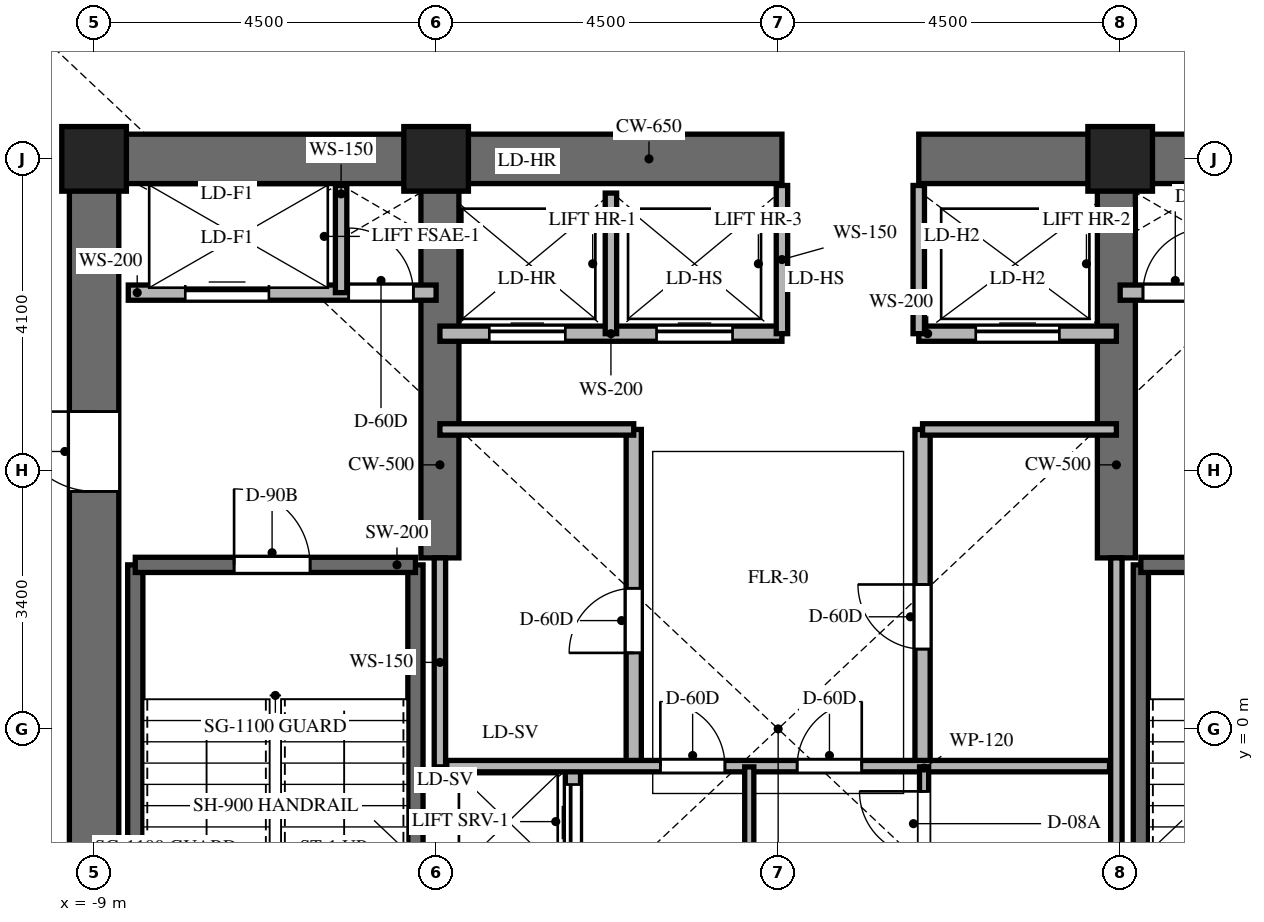
"""IFC4 building model, lengths in metres.
Left out: names, types, materials, properties, quantities, classifications, styles, units other than length and angle.
Written with IfcOpenShell. Run it as: python <this file> out.ifc"""

import sys

from ifc_helpers import new_model, si_unit, direction, frame, frame_2d, origin, origin_2d, place, context, subcontext, project, spatial, rectangle, extrude, element, fill, save


model = new_model("IFC4")
c1 = context("Model", 3, precision=1e-05, world=origin(), true_north=direction((0.0, 1.0)))
c2 = subcontext(c1, "Body", "Model", "MODEL_VIEW")
j1 = project(units=[si_unit("LENGTHUNIT", "METRE"), si_unit("PLANEANGLEUNIT", "RADIAN")], contexts=[c1])
p1 = place(None, origin())
s1 = spatial("IfcSite", under=j1, at=p1, CompositionType="ELEMENT")
p2 = place(p1, origin())
s2 = spatial("IfcBuilding", under=s1, at=p2, CompositionType="ELEMENT")
p3 = place(p2, frame((0.0, 0.0, 305.4)))
s3 = spatial("IfcBuildingStorey", under=s2, at=p3, CompositionType="ELEMENT", Elevation=305.4)
p4 = place(p3, frame((-9.325, 7.5, 0.0), z_axis=(0.0, 0.0, 1.0), x_axis=(1.0, 0.0, 0.0)))
e1 = element("IfcWall", 1, at=p4, inside=s3, PredefinedType="SHEAR", context=c2, shape_type="SweptSolid", body=[
    extrude(rectangle(XDim=9.375, YDim=0.65, at=frame_2d((4.688, 0.0))), origin(), (0.0, 0.0, 1.0), 5.0),
])
p5 = place(p3, frame((1.85, 7.5, 0.0), z_axis=(0.0, 0.0, 1.0), x_axis=(1.0, 0.0, 0.0)))
e2 = element("IfcWall", 2, at=p5, inside=s3, PredefinedType="SHEAR", context=c2, shape_type="SweptSolid", body=[
    extrude(rectangle(XDim=7.475, YDim=0.65, at=frame_2d((3.737, 0.0))), origin(), (0.0, 0.0, 1.0), 5.0),
])
p6 = place(p3, frame((-9.0, -7.175, 0.0), z_axis=(0.0, 0.0, 1.0), x_axis=(0.0, 1.0, 0.0)))
e3 = element("IfcWall", 3, at=p6, inside=s3, PredefinedType="SHEAR", context=c2, shape_type="SweptSolid", body=[
    extrude(rectangle(XDim=14.35, YDim=0.65, at=frame_2d((7.175, 0.0))), origin(), (0.0, 0.0, 1.0), 5.0),
])
p7 = place(p6, frame((10.3, 0.0, 0.0)))
e4 = element("IfcOpeningElement", 4, at=p7, cuts=e3, PredefinedType="OPENING", context=c2, shape_type="SweptSolid", body=[
    extrude(rectangle(XDim=1.05, YDim=2.15, at=frame_2d((0.525, 1.075))), frame((0.0, 0.335, 0.0), z_axis=(0.0, -1.0, 0.0), x_axis=(1.0, 0.0, 0.0)), (0.0, 0.0, 1.0), 0.67),
])
for number, where, z_axis, x_axis in (
    (5, (-4.45, 2.25, 0.0), (0.0, 0.0, 1.0), (0.0, 1.0, 0.0)),
    (6, (4.45, 2.25, 0.0), (0.0, 0.0, 1.0), (0.0, 1.0, 0.0)),
):
    element("IfcWall", number, at=place(p3, frame(where, z_axis=z_axis, x_axis=x_axis)), inside=s3, PredefinedType="SHEAR", context=c2, shape_type="SweptSolid", body=[
        extrude(rectangle(XDim=4.925, YDim=0.5, at=frame_2d((2.462, 0.0))), origin(), (0.0, 0.0, 1.0), 5.0),
    ])
for number, where, z_axis, x_axis in (
    (7, (-8.458, -6.985, 0.0), (0.0, 0.0, 1.0), (0.0, 1.0, 0.0)),
    (8, (-4.772, -6.985, 0.0), (0.0, 0.0, 1.0), (0.0, 1.0, 0.0)),
):
    element("IfcWall", number, at=place(p3, frame(where, z_axis=z_axis, x_axis=x_axis)), inside=s3, PredefinedType="SHEAR", context=c2, shape_type="SweptSolid", body=[
        extrude(rectangle(XDim=9.143, YDim=0.2, at=frame_2d((4.572, 0.0))), origin(), (0.0, 0.0, 1.0), 5.0),
    ])
p8 = place(p3, frame((-8.458, 2.158, 0.0), z_axis=(0.0, 0.0, 1.0), x_axis=(1.0, 0.0, 0.0)))
e9 = element("IfcWall", 9, at=p8, inside=s3, PredefinedType="SHEAR", context=c2, shape_type="SweptSolid", body=[
    extrude(rectangle(XDim=3.686, YDim=0.2, at=frame_2d((1.843, 0.0))), origin(), (0.0, 0.0, 1.0), 5.0),
])
p9 = place(p8, frame((1.3, 0.0, 0.0)))
e10 = element("IfcOpeningElement", 10, at=p9, cuts=e9, PredefinedType="OPENING", context=c2, shape_type="SweptSolid", body=[
    extrude(rectangle(XDim=1.0, YDim=2.15, at=frame_2d((0.5, 1.075))), frame((0.0, 0.11, 0.0), z_axis=(0.0, -1.0, 0.0), x_axis=(1.0, 0.0, 0.0)), (0.0, 0.0, 1.0), 0.22),
])
p10 = place(p3, frame((4.772, -6.985, 0.0), z_axis=(0.0, 0.0, 1.0), x_axis=(0.0, 1.0, 0.0)))
e11 = element("IfcWall", 11, at=p10, inside=s3, PredefinedType="SHEAR", context=c2, shape_type="SweptSolid", body=[
    extrude(rectangle(XDim=9.143, YDim=0.2, at=frame_2d((4.572, 0.0))), origin(), (0.0, 0.0, 1.0), 5.0),
])
p11 = place(p3, frame((4.772, 2.158, 0.0), z_axis=(0.0, 0.0, 1.0), x_axis=(1.0, 0.0, 0.0)))
e12 = element("IfcWall", 12, at=p11, inside=s3, PredefinedType="SHEAR", context=c2, shape_type="SweptSolid", body=[
    extrude(rectangle(XDim=3.686, YDim=0.2, at=frame_2d((1.843, 0.0))), origin(), (0.0, 0.0, 1.0), 5.0),
])
p12 = place(p11, frame((1.35, 0.0, 0.0)))
e13 = element("IfcOpeningElement", 13, at=p12, cuts=e12, PredefinedType="OPENING", context=c2, shape_type="SweptSolid", body=[
    extrude(rectangle(XDim=1.0, YDim=2.15, at=frame_2d((0.5, 1.075))), frame((0.0, 0.11, 0.0), z_axis=(0.0, -1.0, 0.0), x_axis=(1.0, 0.0, 0.0)), (0.0, 0.0, 1.0), 0.22),
])
for number, where, z_axis, x_axis in (
    (14, (4.5, 7.5, 0.0), (0.0, 0.0, 1.0), (1.0, 0.0, 0.0)),
    (15, (-4.5, 7.5, 0.0), (0.0, 0.0, 1.0), (1.0, 0.0, 0.0)),
    (16, (-9.0, 7.5, 0.0), (0.0, 0.0, 1.0), (1.0, 0.0, 0.0)),
):
    element("IfcColumn", number, at=place(p3, frame(where, z_axis=z_axis, x_axis=x_axis)), inside=s3, PredefinedType="COLUMN", context=c2, shape_type="SweptSolid", body=[
        extrude(rectangle(XDim=0.85, YDim=0.85, at=origin_2d()), origin(), (0.0, 0.0, 1.0), 5.0),
    ])
p13 = place(p3, frame((-8.55, 5.74, 0.0), z_axis=(0.0, 0.0, 1.0), x_axis=(1.0, 0.0, 0.0)))
e17 = element("IfcWall", 17, at=p13, inside=s3, PredefinedType="PARTITIONING", context=c2, shape_type="SweptSolid", body=[
    extrude(rectangle(XDim=4.05, YDim=0.2, at=frame_2d((2.025, 0.0))), origin(), (0.0, 0.0, 1.0), 4.68),
])
p14 = place(p13, frame((0.75, 0.0, 0.0)))
e18 = element("IfcOpeningElement", 18, at=p14, cuts=e17, PredefinedType="OPENING", context=c2, shape_type="SweptSolid", body=[
    extrude(rectangle(XDim=1.1, YDim=2.2, at=frame_2d((0.55, 1.1))), frame((0.0, 0.11, 0.0), z_axis=(0.0, -1.0, 0.0), x_axis=(1.0, 0.0, 0.0)), (0.0, 0.0, 1.0), 0.22),
])
p15 = place(p13, frame((2.9, 0.0, 0.0)))
e19 = element("IfcOpeningElement", 19, at=p15, cuts=e17, PredefinedType="OPENING", context=c2, shape_type="SweptSolid", body=[
    extrude(rectangle(XDim=0.85, YDim=2.03, at=frame_2d((0.425, 1.015))), frame((0.0, 0.11, 0.0), z_axis=(0.0, -1.0, 0.0), x_axis=(1.0, 0.0, 0.0)), (0.0, 0.0, 1.0), 0.22),
])
p16 = place(p3, frame((-5.75, 5.74, 0.0), z_axis=(0.0, 0.0, 1.0), x_axis=(0.0, 1.0, 0.0)))
e20 = element("IfcWall", 20, at=p16, inside=s3, PredefinedType="PARTITIONING", context=c2, shape_type="SweptSolid", body=[
    extrude(rectangle(XDim=1.41, YDim=0.15, at=frame_2d((0.705, 0.0))), origin(), (0.0, 0.0, 1.0), 4.68),
])
p17 = place(p3, frame((4.5, 5.74, 0.0), z_axis=(0.0, 0.0, 1.0), x_axis=(1.0, 0.0, 0.0)))
e21 = element("IfcWall", 21, at=p17, inside=s3, PredefinedType="PARTITIONING", context=c2, shape_type="SweptSolid", body=[
    extrude(rectangle(XDim=4.05, YDim=0.2, at=frame_2d((2.025, 0.0))), origin(), (0.0, 0.0, 1.0), 4.68),
])
p18 = place(p17, frame((0.3, 0.0, 0.0)))
e22 = element("IfcOpeningElement", 22, at=p18, cuts=e21, PredefinedType="OPENING", context=c2, shape_type="SweptSolid", body=[
    extrude(rectangle(XDim=0.85, YDim=2.03, at=frame_2d((0.425, 1.015))), frame((0.0, 0.11, 0.0), z_axis=(0.0, -1.0, 0.0), x_axis=(1.0, 0.0, 0.0)), (0.0, 0.0, 1.0), 0.22),
])
p19 = place(p17, frame((2.15, 0.0, 0.0)))
e23 = element("IfcOpeningElement", 23, at=p19, cuts=e21, PredefinedType="OPENING", context=c2, shape_type="SweptSolid", body=[
    extrude(rectangle(XDim=1.1, YDim=2.2, at=frame_2d((0.55, 1.1))), frame((0.0, 0.11, 0.0), z_axis=(0.0, -1.0, 0.0), x_axis=(1.0, 0.0, 0.0)), (0.0, 0.0, 1.0), 0.22),
])
p20 = place(p3, frame((-2.7, -1.972, 0.0), z_axis=(0.0, 0.0, 1.0), x_axis=(0.0, 1.0, 0.0)))
e24 = element("IfcWall", 24, at=p20, inside=s3, PredefinedType="PARTITIONING", context=c2, shape_type="SweptSolid", body=[
    extrude(rectangle(XDim=1.472, YDim=0.2, at=frame_2d((0.736, 0.0))), origin(), (0.0, 0.0, 1.0), 4.68),
])
p21 = place(p20, frame((0.24, 0.0, 0.0)))
e25 = element("IfcOpeningElement", 25, at=p21, cuts=e24, PredefinedType="OPENING", context=c2, shape_type="SweptSolid", body=[
    extrude(rectangle(XDim=1.0, YDim=2.2, at=frame_2d((0.5, 1.1))), frame((0.0, 0.11, 0.0), z_axis=(0.0, -1.0, 0.0), x_axis=(1.0, 0.0, 0.0)), (0.0, 0.0, 1.0), 0.22),
])
p22 = place(p3, frame((-4.45, 5.2, 0.0), z_axis=(0.0, 0.0, 1.0), x_axis=(1.0, 0.0, 0.0)))
e26 = element("IfcWall", 26, at=p22, inside=s3, PredefinedType="PARTITIONING", context=c2, shape_type="SweptSolid", body=[
    extrude(rectangle(XDim=4.5, YDim=0.2, at=frame_2d((2.25, 0.0))), origin(), (0.0, 0.0, 1.0), 4.68),
])
p23 = place(p22, frame((0.65, 0.0, 0.0)))
e27 = element("IfcOpeningElement", 27, at=p23, cuts=e26, PredefinedType="OPENING", context=c2, shape_type="SweptSolid", body=[
    extrude(rectangle(XDim=1.0, YDim=2.2, at=frame_2d((0.5, 1.1))), frame((0.0, 0.11, 0.0), z_axis=(0.0, -1.0, 0.0), x_axis=(1.0, 0.0, 0.0)), (0.0, 0.0, 1.0), 0.22),
])
p24 = place(p22, frame((2.85, 0.0, 0.0)))
e28 = element("IfcOpeningElement", 28, at=p24, cuts=e26, PredefinedType="OPENING", context=c2, shape_type="SweptSolid", body=[
    extrude(rectangle(XDim=1.0, YDim=2.2, at=frame_2d((0.5, 1.1))), frame((0.0, 0.11, 0.0), z_axis=(0.0, -1.0, 0.0), x_axis=(1.0, 0.0, 0.0)), (0.0, 0.0, 1.0), 0.22),
])
p25 = place(p3, frame((1.85, 5.2, 0.0), z_axis=(0.0, 0.0, 1.0), x_axis=(1.0, 0.0, 0.0)))
e29 = element("IfcWall", 29, at=p25, inside=s3, PredefinedType="PARTITIONING", context=c2, shape_type="SweptSolid", body=[
    extrude(rectangle(XDim=2.6, YDim=0.2, at=frame_2d((1.3, 0.0))), origin(), (0.0, 0.0, 1.0), 4.68),
])
p26 = place(p25, frame((0.75, 0.0, 0.0)))
e30 = element("IfcOpeningElement", 30, at=p26, cuts=e29, PredefinedType="OPENING", context=c2, shape_type="SweptSolid", body=[
    extrude(rectangle(XDim=1.1, YDim=2.2, at=frame_2d((0.55, 1.1))), frame((0.0, 0.11, 0.0), z_axis=(0.0, -1.0, 0.0), x_axis=(1.0, 0.0, 0.0)), (0.0, 0.0, 1.0), 0.22),
])
p27 = place(p3, frame((-2.2, 5.2, 0.0), z_axis=(0.0, 0.0, 1.0), x_axis=(0.0, 1.0, 0.0)))
e31 = element("IfcWall", 31, at=p27, inside=s3, PredefinedType="PARTITIONING", context=c2, shape_type="SweptSolid", body=[
    extrude(rectangle(XDim=1.85, YDim=0.15, at=frame_2d((0.925, 0.0))), origin(), (0.0, 0.0, 1.0), 4.68),
])
for number, where, z_axis, x_axis in (
    (32, (0.05, 5.2, 0.0), (0.0, 0.0, 1.0), (0.0, 1.0, 0.0)),
    (33, (1.85, 5.2, 0.0), (0.0, 0.0, 1.0), (0.0, 1.0, 0.0)),
):
    element("IfcWall", number, at=place(p3, frame(where, z_axis=z_axis, x_axis=x_axis)), inside=s3, PredefinedType="PARTITIONING", context=c2, shape_type="SweptSolid", body=[
        extrude(rectangle(XDim=1.95, YDim=0.15, at=frame_2d((0.975, 0.0))), origin(), (0.0, 0.0, 1.0), 4.68),
    ])
p28 = place(p3, frame((-4.45, -0.5, 0.0), z_axis=(0.0, 0.0, 1.0), x_axis=(0.0, 1.0, 0.0)))
e34 = element("IfcWall", 34, at=p28, inside=s3, PredefinedType="PARTITIONING", context=c2, shape_type="SweptSolid", body=[
    extrude(rectangle(XDim=2.75, YDim=0.15, at=frame_2d((1.375, 0.0))), origin(), (0.0, 0.0, 1.0), 4.68),
])
p29 = place(p3, frame((4.45, -1.972, 0.0), z_axis=(0.0, 0.0, 1.0), x_axis=(0.0, 1.0, 0.0)))
e35 = element("IfcWall", 35, at=p29, inside=s3, PredefinedType="PARTITIONING", context=c2, shape_type="SweptSolid", body=[
    extrude(rectangle(XDim=4.222, YDim=0.15, at=frame_2d((2.111, 0.0))), origin(), (0.0, 0.0, 1.0), 4.68),
])
p30 = place(p3, frame((-1.9, -0.5, 0.0), z_axis=(0.0, 0.0, 1.0), x_axis=(0.0, 1.0, 0.0)))
e36 = element("IfcWall", 36, at=p30, inside=s3, PredefinedType="PARTITIONING", context=c2, shape_type="SweptSolid", body=[
    extrude(rectangle(XDim=4.44, YDim=0.2, at=frame_2d((2.22, 0.0))), origin(), (0.0, 0.0, 1.0), 4.68),
])
p31 = place(p30, frame((1.5, 0.0, 0.0)))
e37 = element("IfcOpeningElement", 37, at=p31, cuts=e36, PredefinedType="OPENING", context=c2, shape_type="SweptSolid", body=[
    extrude(rectangle(XDim=0.85, YDim=2.03, at=frame_2d((0.425, 1.015))), frame((0.0, 0.11, 0.0), z_axis=(0.0, -1.0, 0.0), x_axis=(1.0, 0.0, 0.0)), (0.0, 0.0, 1.0), 0.22),
])
p32 = place(p3, frame((-4.45, 3.94, 0.0), z_axis=(0.0, 0.0, 1.0), x_axis=(1.0, 0.0, 0.0)))
e38 = element("IfcWall", 38, at=p32, inside=s3, PredefinedType="PARTITIONING", context=c2, shape_type="SweptSolid", body=[
    extrude(rectangle(XDim=2.55, YDim=0.15, at=frame_2d((1.275, 0.0))), origin(), (0.0, 0.0, 1.0), 4.68),
])
p33 = place(p3, frame((1.9, -0.5, 0.0), z_axis=(0.0, 0.0, 1.0), x_axis=(0.0, 1.0, 0.0)))
e39 = element("IfcWall", 39, at=p33, inside=s3, PredefinedType="PARTITIONING", context=c2, shape_type="SweptSolid", body=[
    extrude(rectangle(XDim=4.44, YDim=0.2, at=frame_2d((2.22, 0.0))), origin(), (0.0, 0.0, 1.0), 4.68),
])
p34 = place(p33, frame((1.55, 0.0, 0.0)))
e40 = element("IfcOpeningElement", 40, at=p34, cuts=e39, PredefinedType="OPENING", context=c2, shape_type="SweptSolid", body=[
    extrude(rectangle(XDim=0.85, YDim=2.03, at=frame_2d((0.425, 1.015))), frame((0.0, 0.11, 0.0), z_axis=(0.0, -1.0, 0.0), x_axis=(1.0, 0.0, 0.0)), (0.0, 0.0, 1.0), 0.22),
])
p35 = place(p3, frame((1.9, 3.94, 0.0), z_axis=(0.0, 0.0, 1.0), x_axis=(1.0, 0.0, 0.0)))
e41 = element("IfcWall", 41, at=p35, inside=s3, PredefinedType="PARTITIONING", context=c2, shape_type="SweptSolid", body=[
    extrude(rectangle(XDim=2.55, YDim=0.15, at=frame_2d((1.275, 0.0))), origin(), (0.0, 0.0, 1.0), 4.68),
])
p36 = place(p3, frame((-4.36, -0.49, 0.0), z_axis=(0.0, 0.0, 1.0), x_axis=(1.0, 0.0, 0.0)))
e42 = element("IfcWall", 42, at=p36, inside=s3, PredefinedType="PARTITIONING", context=c2, shape_type="SweptSolid", body=[
    extrude(rectangle(XDim=8.72, YDim=0.15, at=frame_2d((4.36, 0.0))), origin(), (0.0, 0.0, 1.0), 4.68),
])
p37 = place(p36, frame((2.81, 0.0, 0.0)))
e43 = element("IfcOpeningElement", 43, at=p37, cuts=e42, PredefinedType="OPENING", context=c2, shape_type="SweptSolid", body=[
    extrude(rectangle(XDim=0.85, YDim=2.03, at=frame_2d((0.425, 1.015))), frame((0.0, 0.085, 0.0), z_axis=(0.0, -1.0, 0.0), x_axis=(1.0, 0.0, 0.0)), (0.0, 0.0, 1.0), 0.17),
])
p38 = place(p36, frame((4.61, 0.0, 0.0)))
e44 = element("IfcOpeningElement", 44, at=p38, cuts=e42, PredefinedType="OPENING", context=c2, shape_type="SweptSolid", body=[
    extrude(rectangle(XDim=0.85, YDim=2.03, at=frame_2d((0.425, 1.015))), frame((0.0, 0.085, 0.0), z_axis=(0.0, -1.0, 0.0), x_axis=(1.0, 0.0, 0.0)), (0.0, 0.0, 1.0), 0.17),
])
p39 = place(p3, frame((-0.38, -1.972, 0.0), z_axis=(0.0, 0.0, 1.0), x_axis=(0.0, 1.0, 0.0)))
e45 = element("IfcWall", 45, at=p39, inside=s3, PredefinedType="PARTITIONING", context=c2, shape_type="SweptSolid", body=[
    extrude(rectangle(XDim=1.472, YDim=0.12, at=frame_2d((0.736, 0.0))), origin(), (0.0, 0.0, 1.0), 4.68),
])
p40 = place(p3, frame((1.92, -1.972, 0.0), z_axis=(0.0, 0.0, 1.0), x_axis=(0.0, 1.0, 0.0)))
e46 = element("IfcWall", 46, at=p40, inside=s3, PredefinedType="PARTITIONING", context=c2, shape_type="SweptSolid", body=[
    extrude(rectangle(XDim=1.472, YDim=0.12, at=frame_2d((0.736, 0.0))), origin(), (0.0, 0.0, 1.0), 4.68),
])
p41 = place(p40, frame((0.3, 0.0, 0.0)))
e47 = element("IfcOpeningElement", 47, at=p41, cuts=e46, PredefinedType="OPENING", context=c2, shape_type="SweptSolid", body=[
    extrude(rectangle(XDim=0.85, YDim=2.03, at=frame_2d((0.425, 1.015))), frame((0.0, 0.07, 0.0), z_axis=(0.0, -1.0, 0.0), x_axis=(1.0, 0.0, 0.0)), (0.0, 0.0, 1.0), 0.14),
])
p42 = place(p9, origin())
e48 = element("IfcDoor", 48, at=p42, inside=s3, OperationType="SINGLE_SWING_LEFT", PredefinedType="DOOR", context=c2, shape_type="SweptSolid", body=[
    extrude(rectangle(XDim=1.0, YDim=2.15, at=frame_2d((0.5, 1.075))), frame((0.0, 0.025, 0.0), z_axis=(0.0, -1.0, 0.0), x_axis=(1.0, 0.0, 0.0)), (0.0, 0.0, 1.0), 0.05),
])
fill(e10, e48)
p43 = place(p7, origin())
e49 = element("IfcDoor", 49, at=p43, inside=s3, OperationType="SINGLE_SWING_RIGHT", PredefinedType="DOOR", context=c2, shape_type="SweptSolid", body=[
    extrude(rectangle(XDim=1.05, YDim=2.15, at=frame_2d((0.525, 1.075))), frame((0.0, 0.025, 0.0), z_axis=(0.0, -1.0, 0.0), x_axis=(1.0, 0.0, 0.0)), (0.0, 0.0, 1.0), 0.05),
])
fill(e4, e49)
p44 = place(p14, origin())
e50 = element("IfcDoor", 50, at=p44, inside=s3, OperationType="SLIDING_TO_LEFT", PredefinedType="DOOR", context=c2, shape_type="SweptSolid", body=[
    extrude(rectangle(XDim=1.1, YDim=2.2, at=frame_2d((0.55, 1.1))), frame((0.0, 0.025, 0.0), z_axis=(0.0, -1.0, 0.0), x_axis=(1.0, 0.0, 0.0)), (0.0, 0.0, 1.0), 0.05),
])
fill(e18, e50)
p45 = place(p15, origin())
e51 = element("IfcDoor", 51, at=p45, inside=s3, OperationType="SINGLE_SWING_LEFT", PredefinedType="DOOR", context=c2, shape_type="SweptSolid", body=[
    extrude(rectangle(XDim=0.85, YDim=2.03, at=frame_2d((0.425, 1.015))), frame((0.0, 0.025, 0.0), z_axis=(0.0, -1.0, 0.0), x_axis=(1.0, 0.0, 0.0)), (0.0, 0.0, 1.0), 0.05),
])
fill(e19, e51)
p46 = place(p18, origin())
e52 = element("IfcDoor", 52, at=p46, inside=s3, OperationType="SINGLE_SWING_RIGHT", PredefinedType="DOOR", context=c2, shape_type="SweptSolid", body=[
    extrude(rectangle(XDim=0.85, YDim=2.03, at=frame_2d((0.425, 1.015))), frame((0.0, 0.025, 0.0), z_axis=(0.0, -1.0, 0.0), x_axis=(1.0, 0.0, 0.0)), (0.0, 0.0, 1.0), 0.05),
])
fill(e22, e52)
p47 = place(p21, origin())
e53 = element("IfcDoor", 53, at=p47, inside=s3, OperationType="SLIDING_TO_LEFT", PredefinedType="DOOR", context=c2, shape_type="SweptSolid", body=[
    extrude(rectangle(XDim=1.0, YDim=2.2, at=frame_2d((0.5, 1.1))), frame((0.0, 0.025, 0.0), z_axis=(0.0, -1.0, 0.0), x_axis=(1.0, 0.0, 0.0)), (0.0, 0.0, 1.0), 0.05),
])
fill(e25, e53)
p48 = place(p23, origin())
e54 = element("IfcDoor", 54, at=p48, inside=s3, OperationType="SLIDING_TO_LEFT", PredefinedType="DOOR", context=c2, shape_type="SweptSolid", body=[
    extrude(rectangle(XDim=1.0, YDim=2.2, at=frame_2d((0.5, 1.1))), frame((0.0, 0.025, 0.0), z_axis=(0.0, -1.0, 0.0), x_axis=(1.0, 0.0, 0.0)), (0.0, 0.0, 1.0), 0.05),
])
fill(e27, e54)
p49 = place(p24, origin())
e55 = element("IfcDoor", 55, at=p49, inside=s3, OperationType="SLIDING_TO_RIGHT", PredefinedType="DOOR", context=c2, shape_type="SweptSolid", body=[
    extrude(rectangle(XDim=1.0, YDim=2.2, at=frame_2d((0.5, 1.1))), frame((0.0, 0.025, 0.0), z_axis=(0.0, -1.0, 0.0), x_axis=(1.0, 0.0, 0.0)), (0.0, 0.0, 1.0), 0.05),
])
fill(e28, e55)
p50 = place(p26, origin())
e56 = element("IfcDoor", 56, at=p50, inside=s3, OperationType="SLIDING_TO_RIGHT", PredefinedType="DOOR", context=c2, shape_type="SweptSolid", body=[
    extrude(rectangle(XDim=1.1, YDim=2.2, at=frame_2d((0.55, 1.1))), frame((0.0, 0.025, 0.0), z_axis=(0.0, -1.0, 0.0), x_axis=(1.0, 0.0, 0.0)), (0.0, 0.0, 1.0), 0.05),
])
fill(e30, e56)
p51 = place(p31, origin())
e57 = element("IfcDoor", 57, at=p51, inside=s3, OperationType="SINGLE_SWING_LEFT", PredefinedType="DOOR", context=c2, shape_type="SweptSolid", body=[
    extrude(rectangle(XDim=0.85, YDim=2.03, at=frame_2d((0.425, 1.015))), frame((0.0, 0.025, 0.0), z_axis=(0.0, -1.0, 0.0), x_axis=(1.0, 0.0, 0.0)), (0.0, 0.0, 1.0), 0.05),
])
fill(e37, e57)
p52 = place(p34, origin())
e58 = element("IfcDoor", 58, at=p52, inside=s3, OperationType="SINGLE_SWING_RIGHT", PredefinedType="DOOR", context=c2, shape_type="SweptSolid", body=[
    extrude(rectangle(XDim=0.85, YDim=2.03, at=frame_2d((0.425, 1.015))), frame((0.0, 0.025, 0.0), z_axis=(0.0, -1.0, 0.0), x_axis=(1.0, 0.0, 0.0)), (0.0, 0.0, 1.0), 0.05),
])
fill(e40, e58)
p53 = place(p37, origin())
e59 = element("IfcDoor", 59, at=p53, inside=s3, OperationType="SINGLE_SWING_LEFT", PredefinedType="DOOR", context=c2, shape_type="SweptSolid", body=[
    extrude(rectangle(XDim=0.85, YDim=2.03, at=frame_2d((0.425, 1.015))), frame((0.0, 0.025, 0.0), z_axis=(0.0, -1.0, 0.0), x_axis=(1.0, 0.0, 0.0)), (0.0, 0.0, 1.0), 0.05),
])
fill(e43, e59)
p54 = place(p38, origin())
e60 = element("IfcDoor", 60, at=p54, inside=s3, OperationType="SINGLE_SWING_RIGHT", PredefinedType="DOOR", context=c2, shape_type="SweptSolid", body=[
    extrude(rectangle(XDim=0.85, YDim=2.03, at=frame_2d((0.425, 1.015))), frame((0.0, 0.025, 0.0), z_axis=(0.0, -1.0, 0.0), x_axis=(1.0, 0.0, 0.0)), (0.0, 0.0, 1.0), 0.05),
])
fill(e44, e60)
p55 = place(p41, origin())
e61 = element("IfcDoor", 61, at=p55, inside=s3, OperationType="SINGLE_SWING_RIGHT", PredefinedType="DOOR", context=c2, shape_type="SweptSolid", body=[
    extrude(rectangle(XDim=0.85, YDim=2.03, at=frame_2d((0.425, 1.015))), frame((0.0, 0.025, 0.0), z_axis=(0.0, -1.0, 0.0), x_axis=(1.0, 0.0, 0.0)), (0.0, 0.0, 1.0), 0.05),
])
fill(e47, e61)
save(model, sys.argv[1])
